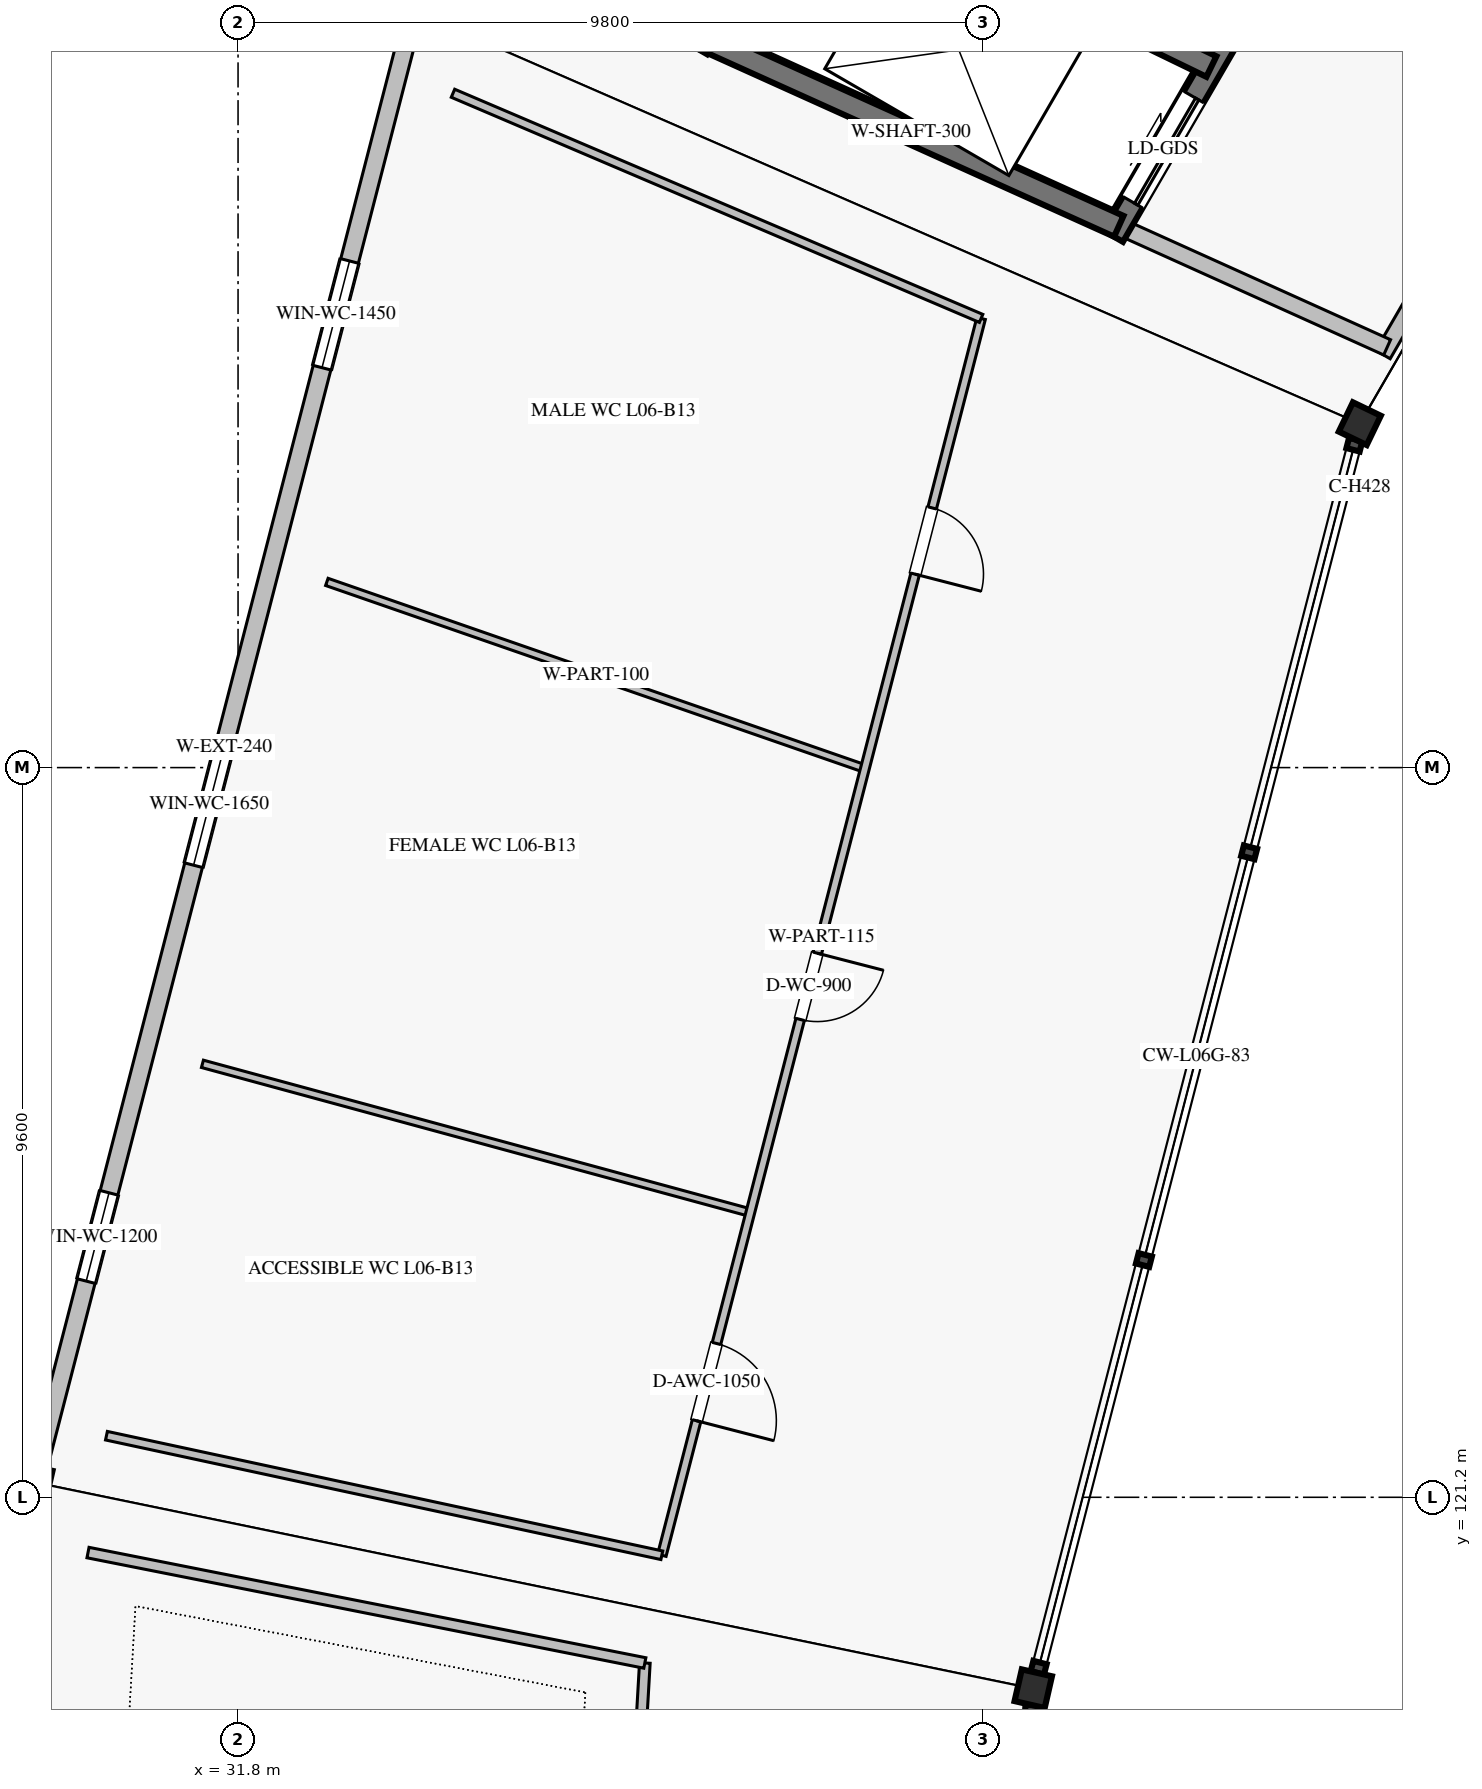
"""IFC4 building model, lengths in metres.
Left out: names, types, materials, properties, quantities, classifications, styles, units other than length and angle.
Written with IfcOpenShell. Run it as: python <this file> out.ifc"""

import sys

from ifc_helpers import new_model, si_unit, direction, frame, frame_2d, origin, origin_2d, place, context, subcontext, project, spatial, rectangle, hollow_rectangle, i_section, extrude, element, fill, save


model = new_model("IFC4")
c1 = context("Model", 3, precision=1e-05, world=origin(), true_north=direction((0.0, 1.0)))
c2 = subcontext(c1, "Body", "Model", "MODEL_VIEW")
j1 = project(units=[si_unit("LENGTHUNIT", "METRE"), si_unit("PLANEANGLEUNIT", "RADIAN")], contexts=[c1])
p1 = place(None, origin())
s1 = spatial("IfcSite", under=j1, at=p1, CompositionType="ELEMENT")
p2 = place(p1, origin())
s2 = spatial("IfcBuilding", under=s1, at=p2, CompositionType="ELEMENT")
p3 = place(p2, frame((0.0, 0.0, 31.28)))
s3 = spatial("IfcBuildingStorey", under=s2, at=p3, CompositionType="ELEMENT", Elevation=31.28)
for number, where, z_axis, x_axis in (
    (1, (46.559, 135.325, 0.0), (0.0, 0.0, 1.0), (-0.901, 0.434, 0.0)),
    (2, (42.262, 118.682, 0.0), (0.0, 0.0, 1.0), (-0.975, 0.223, 0.0)),
):
    element("IfcColumn", number, at=place(p3, frame(where, z_axis=z_axis, x_axis=x_axis)), inside=s3, PredefinedType="COLUMN", context=c2, shape_type="SweptSolid", body=[
        extrude(i_section(OverallWidth=0.407, OverallDepth=0.428, WebThickness=0.02, FlangeThickness=0.035, FilletRadius=0.013, at=origin_2d()), origin(), (0.0, 0.0, 1.0), 5.44),
    ])
p4 = place(p3, frame((29.119, 121.398, 0.0), z_axis=(0.0, 0.0, 1.0), x_axis=(-0.974927912182, 0.222520933954, 0.0)))
e3 = element("IfcColumn", 3, at=p4, inside=s3, PredefinedType="COLUMN", context=c2, shape_type="SweptSolid", body=[
    extrude(hollow_rectangle(XDim=0.4, YDim=0.4, WallThickness=0.019, at=origin_2d()), origin(), (0.0, 0.0, 1.0), 5.44),
])
p5 = place(p3, frame((34.065, 140.556, 0.0), z_axis=(0.0, 0.0, 1.0), x_axis=(-0.249969248142, -0.968253776126, 0.0)))
e4 = element("IfcWall", 4, at=p5, inside=s3, PredefinedType="SOLIDWALL", context=c2, shape_type="SweptSolid", body=[
    extrude(rectangle(XDim=19.586, YDim=0.24, at=frame_2d((9.793, 0.0))), origin(), (0.0, 0.0, 1.0), 4.358),
])
p6 = place(p5, frame((3.192, 0.0, 1.65)))
e5 = element("IfcOpeningElement", 5, at=p6, cuts=e4, PredefinedType="OPENING", context=c2, shape_type="SweptSolid", body=[
    extrude(rectangle(XDim=1.45, YDim=0.95, at=frame_2d((0.725, 0.475))), frame((0.0, 0.13, 0.0), z_axis=(0.0, -1.0, 0.0), x_axis=(1.0, 0.0, 0.0)), (0.0, 0.0, 1.0), 0.26),
])
p7 = place(p5, frame((9.752, 0.0, 1.65)))
e6 = element("IfcOpeningElement", 6, at=p7, cuts=e4, PredefinedType="OPENING", context=c2, shape_type="SweptSolid", body=[
    extrude(rectangle(XDim=1.65, YDim=1.0, at=frame_2d((0.825, 0.5))), frame((0.0, 0.13, 0.0), z_axis=(0.0, -1.0, 0.0), x_axis=(1.0, 0.0, 0.0)), (0.0, 0.0, 1.0), 0.26),
])
p8 = place(p5, frame((15.853, 0.0, 1.65)))
e7 = element("IfcOpeningElement", 7, at=p8, cuts=e4, PredefinedType="OPENING", context=c2, shape_type="SweptSolid", body=[
    extrude(rectangle(XDim=1.2, YDim=0.9, at=frame_2d((0.6, 0.45))), frame((0.0, 0.13, 0.0), z_axis=(0.0, -1.0, 0.0), x_axis=(1.0, 0.0, 0.0)), (0.0, 0.0, 1.0), 0.26),
])
p9 = place(p3, frame((45.9, 142.254, 0.0), z_axis=(0.0, 0.0, 1.0), x_axis=(-0.501629534056, -0.86508254552, 0.0)))
e8 = element("IfcWall", 8, at=p9, inside=s3, PredefinedType="SHEAR", context=c2, shape_type="SweptSolid", body=[
    extrude(rectangle(XDim=5.157, YDim=0.3, at=frame_2d((2.579, 0.0))), origin(), (0.0, 0.0, 1.0), 5.16),
])
p10 = place(p9, frame((0.766, 0.0, 0.0)))
e9 = element("IfcOpeningElement", 9, at=p10, cuts=e8, PredefinedType="OPENING", context=c2, shape_type="SweptSolid", body=[
    extrude(rectangle(XDim=1.1, YDim=2.2, at=frame_2d((0.55, 1.1))), frame((0.0, 0.16, 0.0), z_axis=(0.0, -1.0, 0.0), x_axis=(1.0, 0.0, 0.0)), (0.0, 0.0, 1.0), 0.32),
])
p11 = place(p9, frame((3.042, 0.0, 0.0)))
e10 = element("IfcOpeningElement", 10, at=p11, cuts=e8, PredefinedType="OPENING", context=c2, shape_type="SweptSolid", body=[
    extrude(rectangle(XDim=1.6, YDim=2.3, at=frame_2d((0.8, 1.15))), frame((0.0, 0.16, 0.0), z_axis=(0.0, -1.0, 0.0), x_axis=(1.0, 0.0, 0.0)), (0.0, 0.0, 1.0), 0.32),
])
p12 = place(p3, frame((40.595, 145.012, 0.0), z_axis=(0.0, 0.0, 1.0), x_axis=(-0.501630260479, -0.865082124293, 0.0)))
e11 = element("IfcWall", 11, at=p12, inside=s3, PredefinedType="SHEAR", context=c2, shape_type="SweptSolid", body=[
    extrude(rectangle(XDim=5.491, YDim=0.3, at=frame_2d((2.746, 0.0))), origin(), (0.0, 0.0, 1.0), 5.16),
])
p13 = place(p3, frame((43.388, 137.922, 0.0), z_axis=(0.0, 0.0, 1.0), x_axis=(-0.911521602376, 0.41125219562, 0.0)))
e12 = element("IfcWall", 12, at=p13, inside=s3, PredefinedType="SHEAR", context=c2, shape_type="SweptSolid", body=[
    extrude(rectangle(XDim=6.004, YDim=0.3, at=frame_2d((3.002, 0.0))), origin(), (0.0, 0.0, 1.0), 5.16),
])
p14 = place(p3, frame((44.606, 140.023, 0.0), z_axis=(0.0, 0.0, 1.0), x_axis=(-0.899759302591, 0.436386522936, 0.0)))
e13 = element("IfcWall", 13, at=p14, inside=s3, PredefinedType="SHEAR", context=c2, shape_type="SweptSolid", body=[
    extrude(rectangle(XDim=5.989, YDim=0.3, at=frame_2d((2.995, 0.0))), origin(), (0.0, 0.0, 1.0), 5.16),
])
p15 = place(p3, frame((54.944, 150.17, 0.0), z_axis=(0.0, 0.0, 1.0), x_axis=(-0.501612626242, -0.865092349518, 0.0)))
e14 = element("IfcWall", 14, at=p15, inside=s3, PredefinedType="SOLIDWALL", context=c2, shape_type="SweptSolid", body=[
    extrude(rectangle(XDim=16.11, YDim=0.22, at=frame_2d((8.055, 0.0))), origin(), (0.0, 0.0, 1.0), 5.16),
])
p16 = place(p3, frame((46.918, 136.329, 0.0), z_axis=(0.0, 0.0, 1.0), x_axis=(-0.91149641055, 0.411308027582, 0.0)))
e15 = element("IfcWall", 15, at=p16, inside=s3, PredefinedType="SOLIDWALL", context=c2, shape_type="SweptSolid", body=[
    extrude(rectangle(XDim=3.873, YDim=0.22, at=frame_2d((1.937, 0.0))), origin(), (0.0, 0.0, 1.0), 5.16),
])
p17 = place(p3, frame((41.576, 136.709, 0.0), z_axis=(0.0, 0.0, 1.0), x_axis=(-0.249966328054, -0.968254529986, 0.0)))
e16 = element("IfcWall", 16, at=p17, inside=s3, PredefinedType="PARTITIONING", context=c2, shape_type="SweptSolid", body=[
    extrude(rectangle(XDim=16.806, YDim=0.115, at=frame_2d((8.403, 0.0))), origin(), (0.0, 0.0, 1.0), 4.48),
])
p18 = place(p17, frame((2.575, 0.0, 0.0)))
e17 = element("IfcOpeningElement", 17, at=p18, cuts=e16, PredefinedType="OPENING", context=c2, shape_type="SweptSolid", body=[
    extrude(rectangle(XDim=0.9, YDim=2.1, at=frame_2d((0.45, 1.05))), frame((0.0, 0.067, 0.0), z_axis=(0.0, -1.0, 0.0), x_axis=(1.0, 0.0, 0.0)), (0.0, 0.0, 1.0), 0.135),
])
p19 = place(p17, frame((8.625, 0.0, 0.0)))
e18 = element("IfcOpeningElement", 18, at=p19, cuts=e16, PredefinedType="OPENING", context=c2, shape_type="SweptSolid", body=[
    extrude(rectangle(XDim=0.9, YDim=2.1, at=frame_2d((0.45, 1.05))), frame((0.0, 0.067, 0.0), z_axis=(0.0, -1.0, 0.0), x_axis=(1.0, 0.0, 0.0)), (0.0, 0.0, 1.0), 0.135),
])
p20 = place(p17, frame((13.928, 0.0, 0.0)))
e19 = element("IfcOpeningElement", 19, at=p20, cuts=e16, PredefinedType="OPENING", context=c2, shape_type="SweptSolid", body=[
    extrude(rectangle(XDim=1.05, YDim=2.1, at=frame_2d((0.525, 1.05))), frame((0.0, 0.067, 0.0), z_axis=(0.0, -1.0, 0.0), x_axis=(1.0, 0.0, 0.0)), (0.0, 0.0, 1.0), 0.135),
])
p21 = place(p3, frame((41.576, 136.709, 0.0), z_axis=(0.0, 0.0, 1.0), x_axis=(-0.919898990597, 0.39215538642, 0.0)))
e20 = element("IfcWall", 20, at=p21, inside=s3, PredefinedType="PARTITIONING", context=c2, shape_type="SweptSolid", body=[
    extrude(rectangle(XDim=7.553, YDim=0.115, at=frame_2d((3.777, 0.0))), origin(), (0.0, 0.0, 1.0), 4.48),
])
p22 = place(p3, frame((37.375, 120.437, 0.0), z_axis=(0.0, 0.0, 1.0), x_axis=(-0.977591606225, 0.210510454464, 0.0)))
e21 = element("IfcWall", 21, at=p22, inside=s3, PredefinedType="PARTITIONING", context=c2, shape_type="SweptSolid", body=[
    extrude(rectangle(XDim=7.475, YDim=0.115, at=frame_2d((3.737, 0.0))), origin(), (0.0, 0.0, 1.0), 4.48),
])
p23 = place(p3, frame((40.047, 130.786, 0.0), z_axis=(0.0, 0.0, 1.0), x_axis=(-0.944734783815, 0.327835611627, 0.0)))
e22 = element("IfcWall", 22, at=p23, inside=s3, PredefinedType="PARTITIONING", context=c2, shape_type="SweptSolid", body=[
    extrude(rectangle(XDim=7.493, YDim=0.1, at=frame_2d((3.747, 0.0))), origin(), (0.0, 0.0, 1.0), 4.48),
])
p24 = place(p3, frame((38.539, 124.945, 0.0), z_axis=(0.0, 0.0, 1.0), x_axis=(-0.965026596671, 0.262151993541, 0.0)))
e23 = element("IfcWall", 23, at=p24, inside=s3, PredefinedType="PARTITIONING", context=c2, shape_type="SweptSolid", body=[
    extrude(rectangle(XDim=7.469, YDim=0.1, at=frame_2d((3.734, 0.0))), origin(), (0.0, 0.0, 1.0), 4.48),
])
p25 = place(p3, frame((37.152, 119.02, 0.0), z_axis=(0.0, 0.0, 1.0), x_axis=(-0.057605127437, -0.998339445927, 0.0)))
e24 = element("IfcWall", 24, at=p25, inside=s3, PredefinedType="PARTITIONING", context=c2, shape_type="SweptSolid", body=[
    extrude(rectangle(XDim=16.338, YDim=0.14, at=frame_2d((8.169, 0.0))), origin(), (0.0, 0.0, 1.0), 4.48),
])
p26 = place(p25, frame((7.219, 0.0, 0.0)))
e25 = element("IfcOpeningElement", 25, at=p26, cuts=e24, PredefinedType="OPENING", context=c2, shape_type="SweptSolid", body=[
    extrude(rectangle(XDim=1.9, YDim=2.35, at=frame_2d((0.95, 1.175))), frame((0.0, 0.08, 0.0), z_axis=(0.0, -1.0, 0.0), x_axis=(1.0, 0.0, 0.0)), (0.0, 0.0, 1.0), 0.16),
])
p27 = place(p3, frame((37.152, 119.02, 0.0), z_axis=(0.0, 0.0, 1.0), x_axis=(-0.980903700741, 0.194494035571, 0.0)))
e26 = element("IfcWall", 26, at=p27, inside=s3, PredefinedType="PARTITIONING", context=c2, shape_type="SweptSolid", body=[
    extrude(rectangle(XDim=7.469, YDim=0.14, at=frame_2d((3.734, 0.0))), origin(), (0.0, 0.0, 1.0), 4.48),
])
p28 = place(p6, origin())
e27 = element("IfcWindow", 27, at=p28, inside=s3, PartitioningType="SINGLE_PANEL", PredefinedType="WINDOW", context=c2, shape_type="SweptSolid", body=[
    extrude(rectangle(XDim=1.45, YDim=0.95, at=frame_2d((0.725, 0.475))), frame((0.0, 0.03, 0.0), z_axis=(0.0, -1.0, 0.0), x_axis=(1.0, 0.0, 0.0)), (0.0, 0.0, 1.0), 0.06),
])
fill(e5, e27)
p29 = place(p7, origin())
e28 = element("IfcWindow", 28, at=p29, inside=s3, PartitioningType="SINGLE_PANEL", PredefinedType="WINDOW", context=c2, shape_type="SweptSolid", body=[
    extrude(rectangle(XDim=1.65, YDim=1.0, at=frame_2d((0.825, 0.5))), frame((0.0, 0.03, 0.0), z_axis=(0.0, -1.0, 0.0), x_axis=(1.0, 0.0, 0.0)), (0.0, 0.0, 1.0), 0.06),
])
fill(e6, e28)
p30 = place(p8, origin())
e29 = element("IfcWindow", 29, at=p30, inside=s3, PartitioningType="SINGLE_PANEL", PredefinedType="WINDOW", context=c2, shape_type="SweptSolid", body=[
    extrude(rectangle(XDim=1.2, YDim=0.9, at=frame_2d((0.6, 0.45))), frame((0.0, 0.03, 0.0), z_axis=(0.0, -1.0, 0.0), x_axis=(1.0, 0.0, 0.0)), (0.0, 0.0, 1.0), 0.06),
])
fill(e7, e29)
p31 = place(p11, origin())
e30 = element("IfcDoor", 30, at=p31, inside=s3, OperationType="SLIDING_TO_LEFT", PredefinedType="DOOR", context=c2, shape_type="SweptSolid", body=[
    extrude(rectangle(XDim=1.6, YDim=2.3, at=frame_2d((0.8, 1.15))), frame((0.0, 0.025, 0.0), z_axis=(0.0, -1.0, 0.0), x_axis=(1.0, 0.0, 0.0)), (0.0, 0.0, 1.0), 0.05),
])
fill(e10, e30)
p32 = place(p18, origin())
e31 = element("IfcDoor", 31, at=p32, inside=s3, OperationType="SINGLE_SWING_RIGHT", PredefinedType="DOOR", context=c2, shape_type="SweptSolid", body=[
    extrude(rectangle(XDim=0.9, YDim=2.1, at=frame_2d((0.45, 1.05))), frame((0.0, 0.025, 0.0), z_axis=(0.0, -1.0, 0.0), x_axis=(1.0, 0.0, 0.0)), (0.0, 0.0, 1.0), 0.05),
])
fill(e17, e31)
p33 = place(p19, origin())
e32 = element("IfcDoor", 32, at=p33, inside=s3, OperationType="SINGLE_SWING_LEFT", PredefinedType="DOOR", context=c2, shape_type="SweptSolid", body=[
    extrude(rectangle(XDim=0.9, YDim=2.1, at=frame_2d((0.45, 1.05))), frame((0.0, 0.025, 0.0), z_axis=(0.0, -1.0, 0.0), x_axis=(1.0, 0.0, 0.0)), (0.0, 0.0, 1.0), 0.05),
])
fill(e18, e32)
p34 = place(p20, origin())
e33 = element("IfcDoor", 33, at=p34, inside=s3, OperationType="SINGLE_SWING_RIGHT", PredefinedType="DOOR", context=c2, shape_type="SweptSolid", body=[
    extrude(rectangle(XDim=1.05, YDim=2.1, at=frame_2d((0.525, 1.05))), frame((0.0, 0.025, 0.0), z_axis=(0.0, -1.0, 0.0), x_axis=(1.0, 0.0, 0.0)), (0.0, 0.0, 1.0), 0.05),
])
fill(e19, e33)
save(model, sys.argv[1])
